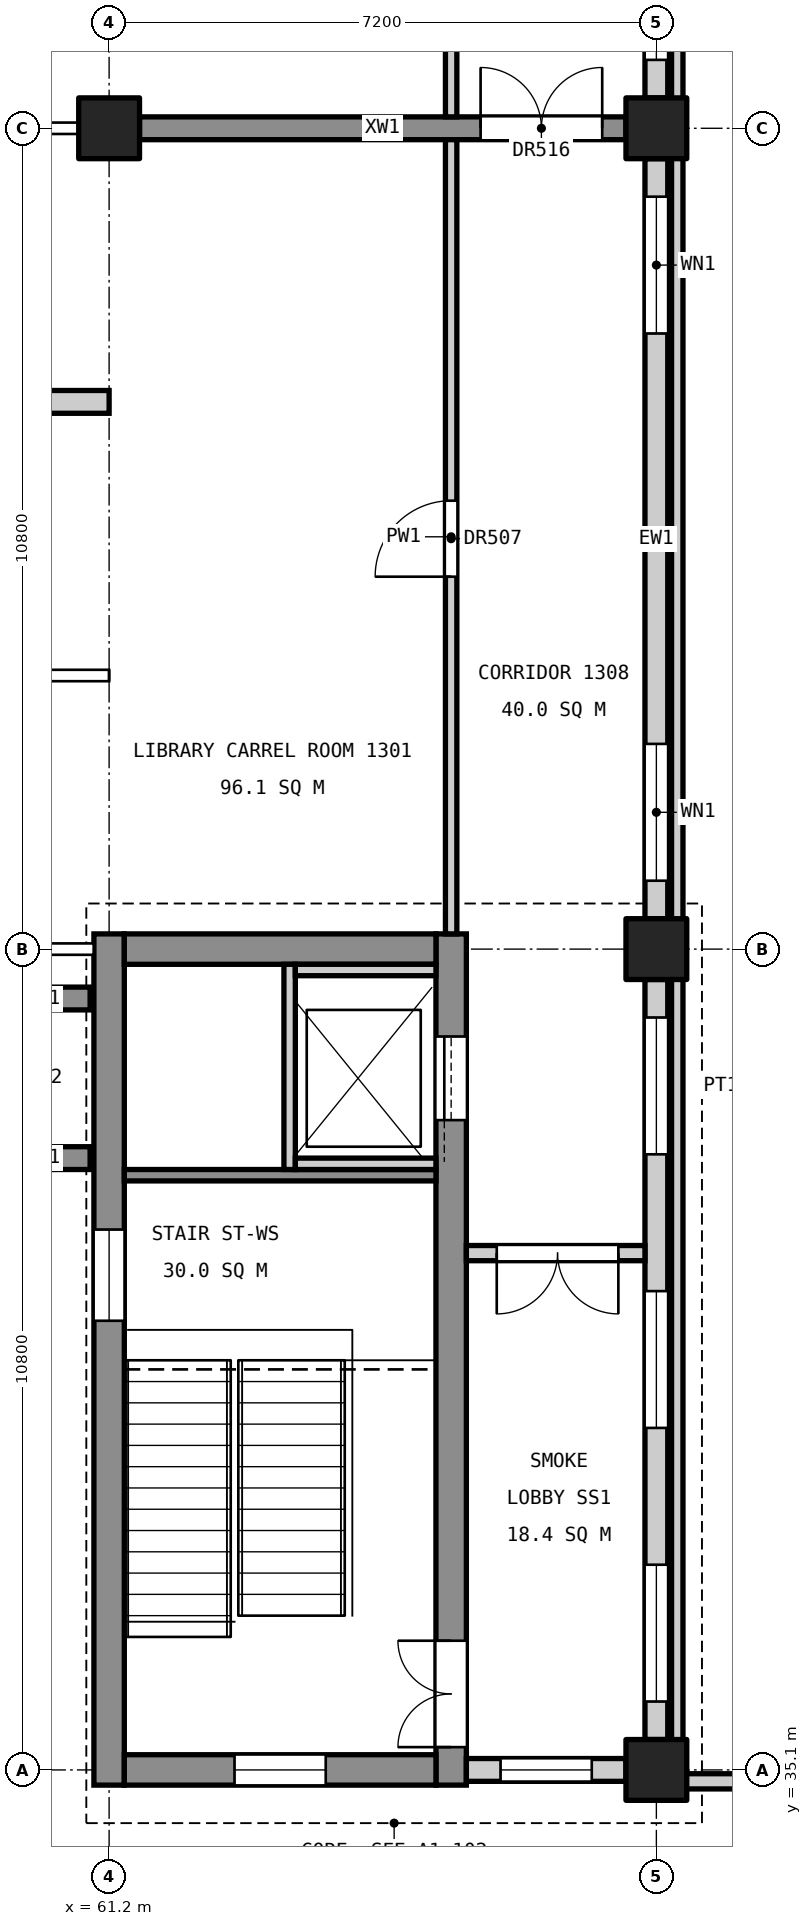
"""IFC4 building model, lengths in metres.
Left out: names, types, materials, properties, quantities, classifications, styles, units other than length and angle.
Written with IfcOpenShell. Run it as: python <this file> out.ifc"""

import sys

from ifc_helpers import new_model, si_unit, direction, frame, frame_2d, origin, origin_2d, place, context, subcontext, project, spatial, rectangle, extrude, element, fill, save


model = new_model("IFC4")
c1 = context("Model", 3, precision=1e-05, world=origin(), true_north=direction((0.0, 1.0)))
c2 = subcontext(c1, "Body", "Model", "MODEL_VIEW")
j1 = project(units=[si_unit("LENGTHUNIT", "METRE"), si_unit("PLANEANGLEUNIT", "RADIAN")], contexts=[c1])
p1 = place(None, origin())
s1 = spatial("IfcSite", under=j1, at=p1, CompositionType="ELEMENT")
p2 = place(p1, origin())
s2 = spatial("IfcBuilding", under=s1, at=p2, CompositionType="ELEMENT")
p3 = place(p2, frame((0.0, 0.0, 65.4)))
s3 = spatial("IfcBuildingStorey", under=s2, at=p3, CompositionType="ELEMENT", Elevation=65.4)
for number, where, z_axis, x_axis in (
    (1, (61.2, 56.7, 0.0), (0.0, 0.0, 1.0), (1.0, 0.0, 0.0)),
    (2, (68.4, 35.1, 0.0), (0.0, 0.0, 1.0), (1.0, 0.0, 0.0)),
    (3, (68.4, 45.9, 0.0), (0.0, 0.0, 1.0), (1.0, 0.0, 0.0)),
    (4, (68.4, 56.7, 0.0), (0.0, 0.0, 1.0), (1.0, 0.0, 0.0)),
):
    element("IfcColumn", number, at=place(p3, frame(where, z_axis=z_axis, x_axis=x_axis)), inside=s3, PredefinedType="COLUMN", context=c2, shape_type="SweptSolid", body=[
        extrude(rectangle(XDim=0.8, YDim=0.8, at=origin_2d()), origin(), (0.0, 0.0, 1.0), 4.8),
    ])
p4 = place(p3, frame((61.2, 34.9, 0.0), z_axis=(0.0, 0.0, 1.0), x_axis=(0.0, 1.0, 0.0)))
e5 = element("IfcWall", 5, at=p4, inside=s3, PredefinedType="SHEAR", context=c2, shape_type="SweptSolid", body=[
    extrude(rectangle(XDim=11.2, YDim=0.4, at=frame_2d((5.6, 0.0))), origin(), (0.0, 0.0, 1.0), 4.55),
])
p5 = place(p4, frame((6.11, 0.0, 3.4)))
e6 = element("IfcOpeningElement", 6, at=p5, cuts=e5, PredefinedType="OPENING", context=c2, shape_type="SweptSolid", body=[
    extrude(rectangle(XDim=1.2, YDim=0.9, at=frame_2d((0.6, 0.45))), frame((0.0, 0.21, 0.0), z_axis=(0.0, -1.0, 0.0), x_axis=(1.0, 0.0, 0.0)), (0.0, 0.0, 1.0), 0.42),
])
p6 = place(p3, frame((65.7, 34.9, 0.0), z_axis=(0.0, 0.0, 1.0), x_axis=(0.0, 1.0, 0.0)))
e7 = element("IfcWall", 7, at=p6, inside=s3, PredefinedType="SHEAR", context=c2, shape_type="SweptSolid", body=[
    extrude(rectangle(XDim=11.2, YDim=0.4, at=frame_2d((5.6, 0.0))), origin(), (0.0, 0.0, 1.0), 4.55),
])
p7 = place(p6, frame((0.5, 0.0, 0.0)))
e8 = element("IfcOpeningElement", 8, at=p7, cuts=e7, PredefinedType="OPENING", context=c2, shape_type="SweptSolid", body=[
    extrude(rectangle(XDim=1.4, YDim=2.1, at=frame_2d((0.7, 1.05))), frame((0.0, 0.21, 0.0), z_axis=(0.0, -1.0, 0.0), x_axis=(1.0, 0.0, 0.0)), (0.0, 0.0, 1.0), 0.42),
])
p8 = place(p6, frame((8.75, 0.0, 0.0)))
e9 = element("IfcOpeningElement", 9, at=p8, cuts=e7, PredefinedType="OPENING", context=c2, shape_type="SweptSolid", body=[
    extrude(rectangle(XDim=1.1, YDim=2.1, at=frame_2d((0.55, 1.05))), frame((0.0, 0.21, 0.0), z_axis=(0.0, -1.0, 0.0), x_axis=(1.0, 0.0, 0.0)), (0.0, 0.0, 1.0), 0.42),
])
p9 = place(p3, frame((61.4, 35.1, 0.0), z_axis=(0.0, 0.0, 1.0), x_axis=(1.0, 0.0, 0.0)))
e10 = element("IfcWall", 10, at=p9, inside=s3, PredefinedType="SHEAR", context=c2, shape_type="SweptSolid", body=[
    extrude(rectangle(XDim=4.1, YDim=0.4, at=frame_2d((2.05, 0.0))), origin(), (0.0, 0.0, 1.0), 4.55),
])
p10 = place(p9, frame((1.45, 0.0, 3.4)))
e11 = element("IfcOpeningElement", 11, at=p10, cuts=e10, PredefinedType="OPENING", context=c2, shape_type="SweptSolid", body=[
    extrude(rectangle(XDim=1.2, YDim=0.9, at=frame_2d((0.6, 0.45))), frame((0.0, 0.21, 0.0), z_axis=(0.0, -1.0, 0.0), x_axis=(1.0, 0.0, 0.0)), (0.0, 0.0, 1.0), 0.42),
])
p11 = place(p3, frame((61.4, 45.9, 0.0), z_axis=(0.0, 0.0, 1.0), x_axis=(1.0, 0.0, 0.0)))
e12 = element("IfcWall", 12, at=p11, inside=s3, PredefinedType="SHEAR", context=c2, shape_type="SweptSolid", body=[
    extrude(rectangle(XDim=4.1, YDim=0.4, at=frame_2d((2.05, 0.0))), origin(), (0.0, 0.0, 1.0), 4.55),
])
for number, where, z_axis, x_axis in (
    (13, (60.95, 43.15, 0.0), (0.0, 0.0, 1.0), (-1.0, 0.0, 0.0)),
    (14, (60.95, 45.25, 0.0), (0.0, 0.0, 1.0), (-1.0, 0.0, 0.0)),
):
    element("IfcWall", number, at=place(p3, frame(where, z_axis=z_axis, x_axis=x_axis)), inside=s3, PredefinedType="SHEAR", context=c2, shape_type="SweptSolid", body=[
        extrude(rectangle(XDim=1.25, YDim=0.3, at=frame_2d((0.625, 0.0))), origin(), (0.0, 0.0, 1.0), 4.8),
    ])
p12 = place(p3, frame((61.6, 56.7, 0.0), z_axis=(0.0, 0.0, 1.0), x_axis=(1.0, 0.0, 0.0)))
e15 = element("IfcWall", 15, at=p12, inside=s3, PredefinedType="SHEAR", context=c2, shape_type="SweptSolid", body=[
    extrude(rectangle(XDim=6.4, YDim=0.3, at=frame_2d((3.2, 0.0))), origin(), (0.0, 0.0, 1.0), 4.55),
])
p13 = place(p12, frame((4.488, 0.0, 0.0)))
e16 = element("IfcOpeningElement", 16, at=p13, cuts=e15, PredefinedType="OPENING", context=c2, shape_type="SweptSolid", body=[
    extrude(rectangle(XDim=1.6, YDim=2.1, at=frame_2d((0.8, 1.05))), frame((0.0, 0.16, 0.0), z_axis=(0.0, -1.0, 0.0), x_axis=(1.0, 0.0, 0.0)), (0.0, 0.0, 1.0), 0.32),
])
p14 = place(p3, frame((61.4, 42.925, 0.0), z_axis=(0.0, 0.0, 1.0), x_axis=(1.0, 0.0, 0.0)))
e17 = element("IfcWall", 17, at=p14, inside=s3, PredefinedType="SOLIDWALL", context=c2, shape_type="SweptSolid", body=[
    extrude(rectangle(XDim=4.1, YDim=0.15, at=frame_2d((2.05, 0.0))), origin(), (0.0, 0.0, 1.0), 4.55),
])
p15 = place(p3, frame((63.575, 43.0, 0.0), z_axis=(0.0, 0.0, 1.0), x_axis=(0.0, 1.0, 0.0)))
e18 = element("IfcWall", 18, at=p15, inside=s3, PredefinedType="SOLIDWALL", context=c2, shape_type="SweptSolid", body=[
    extrude(rectangle(XDim=2.7, YDim=0.15, at=frame_2d((1.35, 0.0))), origin(), (0.0, 0.0, 1.0), 4.8),
])
for number, where, z_axis, x_axis in (
    (19, (63.65, 43.075, 0.0), (0.0, 0.0, 1.0), (1.0, 0.0, 0.0)),
    (20, (63.65, 45.625, 0.0), (0.0, 0.0, 1.0), (1.0, 0.0, 0.0)),
):
    element("IfcWall", number, at=place(p3, frame(where, z_axis=z_axis, x_axis=x_axis)), inside=s3, PredefinedType="SOLIDWALL", context=c2, shape_type="SweptSolid", body=[
        extrude(rectangle(XDim=1.85, YDim=0.15, at=frame_2d((0.925, 0.0))), origin(), (0.0, 0.0, 1.0), 4.8),
    ])
p16 = place(p3, frame((79.55, 34.95, 0.0), z_axis=(0.0, 0.0, 1.0), x_axis=(-1.0, 0.0, 0.0)))
e21 = element("IfcWall", 21, at=p16, inside=s3, PredefinedType="PARAPET", context=c2, shape_type="SweptSolid", body=[
    extrude(rectangle(XDim=10.8, YDim=0.2, at=frame_2d((5.4, 0.0))), origin(), (0.0, 0.0, 1.0), 1.2),
])
p17 = place(p3, frame((68.675, 35.05, 0.0), z_axis=(0.0, 0.0, 1.0), x_axis=(0.0, 1.0, 0.0)))
e22 = element("IfcWall", 22, at=p17, inside=s3, PredefinedType="PARAPET", context=c2, shape_type="SweptSolid", body=[
    extrude(rectangle(XDim=64.9, YDim=0.15, at=frame_2d((32.45, 0.0))), origin(), (0.0, 0.0, 1.0), 0.3),
])
p18 = place(p3, frame((65.9, 35.1, 0.0), z_axis=(0.0, 0.0, 1.0), x_axis=(1.0, 0.0, 0.0)))
e23 = element("IfcWall", 23, at=p18, inside=s3, PredefinedType="STANDARD", context=c2, shape_type="SweptSolid", body=[
    extrude(rectangle(XDim=2.1, YDim=0.3, at=frame_2d((1.05, 0.0))), origin(), (0.0, 0.0, 1.0), 3.85),
])
p19 = place(p18, frame((0.45, 0.0, 0.9)))
e24 = element("IfcOpeningElement", 24, at=p19, cuts=e23, PredefinedType="OPENING", context=c2, shape_type="SweptSolid", body=[
    extrude(rectangle(XDim=1.2, YDim=2.4, at=frame_2d((0.6, 1.2))), frame((0.0, 0.16, 0.0), z_axis=(0.0, -1.0, 0.0), x_axis=(1.0, 0.0, 0.0)), (0.0, 0.0, 1.0), 0.32),
])
p20 = place(p3, frame((68.4, 35.5, 0.0), z_axis=(0.0, 0.0, 1.0), x_axis=(0.0, 1.0, 0.0)))
e25 = element("IfcWall", 25, at=p20, inside=s3, PredefinedType="STANDARD", context=c2, shape_type="SweptSolid", body=[
    extrude(rectangle(XDim=10.0, YDim=0.3, at=frame_2d((5.0, 0.0))), origin(), (0.0, 0.0, 1.0), 3.55),
])
p21 = place(p20, frame((0.5, 0.0, 0.9)))
e26 = element("IfcOpeningElement", 26, at=p21, cuts=e25, PredefinedType="OPENING", context=c2, shape_type="SweptSolid", body=[
    extrude(rectangle(XDim=1.8, YDim=2.4, at=frame_2d((0.9, 1.2))), frame((0.0, 0.16, 0.0), z_axis=(0.0, -1.0, 0.0), x_axis=(1.0, 0.0, 0.0)), (0.0, 0.0, 1.0), 0.32),
])
p22 = place(p20, frame((4.1, 0.0, 0.9)))
e27 = element("IfcOpeningElement", 27, at=p22, cuts=e25, PredefinedType="OPENING", context=c2, shape_type="SweptSolid", body=[
    extrude(rectangle(XDim=1.8, YDim=2.4, at=frame_2d((0.9, 1.2))), frame((0.0, 0.16, 0.0), z_axis=(0.0, -1.0, 0.0), x_axis=(1.0, 0.0, 0.0)), (0.0, 0.0, 1.0), 0.32),
])
p23 = place(p20, frame((7.7, 0.0, 0.9)))
e28 = element("IfcOpeningElement", 28, at=p23, cuts=e25, PredefinedType="OPENING", context=c2, shape_type="SweptSolid", body=[
    extrude(rectangle(XDim=1.8, YDim=2.4, at=frame_2d((0.9, 1.2))), frame((0.0, 0.16, 0.0), z_axis=(0.0, -1.0, 0.0), x_axis=(1.0, 0.0, 0.0)), (0.0, 0.0, 1.0), 0.32),
])
p24 = place(p3, frame((68.4, 46.3, 0.0), z_axis=(0.0, 0.0, 1.0), x_axis=(0.0, 1.0, 0.0)))
e29 = element("IfcWall", 29, at=p24, inside=s3, PredefinedType="STANDARD", context=c2, shape_type="SweptSolid", body=[
    extrude(rectangle(XDim=10.0, YDim=0.3, at=frame_2d((5.0, 0.0))), origin(), (0.0, 0.0, 1.0), 3.55),
])
p25 = place(p24, frame((0.5, 0.0, 0.9)))
e30 = element("IfcOpeningElement", 30, at=p25, cuts=e29, PredefinedType="OPENING", context=c2, shape_type="SweptSolid", body=[
    extrude(rectangle(XDim=1.8, YDim=2.4, at=frame_2d((0.9, 1.2))), frame((0.0, 0.16, 0.0), z_axis=(0.0, -1.0, 0.0), x_axis=(1.0, 0.0, 0.0)), (0.0, 0.0, 1.0), 0.32),
])
p26 = place(p24, frame((7.7, 0.0, 0.9)))
e31 = element("IfcOpeningElement", 31, at=p26, cuts=e29, PredefinedType="OPENING", context=c2, shape_type="SweptSolid", body=[
    extrude(rectangle(XDim=1.8, YDim=2.4, at=frame_2d((0.9, 1.2))), frame((0.0, 0.16, 0.0), z_axis=(0.0, -1.0, 0.0), x_axis=(1.0, 0.0, 0.0)), (0.0, 0.0, 1.0), 0.32),
])
p27 = place(p3, frame((68.4, 57.1, 0.0), z_axis=(0.0, 0.0, 1.0), x_axis=(0.0, 1.0, 0.0)))
e32 = element("IfcWall", 32, at=p27, inside=s3, PredefinedType="STANDARD", context=c2, shape_type="SweptSolid", body=[
    extrude(rectangle(XDim=10.0, YDim=0.3, at=frame_2d((5.0, 0.0))), origin(), (0.0, 0.0, 1.0), 3.55),
])
p28 = place(p27, frame((0.5, 0.0, 0.9)))
e33 = element("IfcOpeningElement", 33, at=p28, cuts=e32, PredefinedType="OPENING", context=c2, shape_type="SweptSolid", body=[
    extrude(rectangle(XDim=1.8, YDim=2.4, at=frame_2d((0.9, 1.2))), frame((0.0, 0.16, 0.0), z_axis=(0.0, -1.0, 0.0), x_axis=(1.0, 0.0, 0.0)), (0.0, 0.0, 1.0), 0.32),
])
p29 = place(p27, frame((4.1, 0.0, 0.9)))
e34 = element("IfcOpeningElement", 34, at=p29, cuts=e32, PredefinedType="OPENING", context=c2, shape_type="SweptSolid", body=[
    extrude(rectangle(XDim=1.8, YDim=2.4, at=frame_2d((0.9, 1.2))), frame((0.0, 0.16, 0.0), z_axis=(0.0, -1.0, 0.0), x_axis=(1.0, 0.0, 0.0)), (0.0, 0.0, 1.0), 0.32),
])
p30 = place(p27, frame((7.7, 0.0, 0.9)))
e35 = element("IfcOpeningElement", 35, at=p30, cuts=e32, PredefinedType="OPENING", context=c2, shape_type="SweptSolid", body=[
    extrude(rectangle(XDim=1.8, YDim=2.4, at=frame_2d((0.9, 1.2))), frame((0.0, 0.16, 0.0), z_axis=(0.0, -1.0, 0.0), x_axis=(1.0, 0.0, 0.0)), (0.0, 0.0, 1.0), 0.32),
])
p31 = place(p3, frame((56.4, 53.1, 0.0), z_axis=(0.0, 0.0, 1.0), x_axis=(1.0, 0.0, 0.0)))
e36 = element("IfcWall", 36, at=p31, inside=s3, PredefinedType="STANDARD", context=c2, shape_type="SweptSolid", body=[
    extrude(rectangle(XDim=4.8, YDim=0.3, at=frame_2d((2.4, 0.0))), origin(), (0.0, 0.0, 1.0), 3.65),
])
p32 = place(p3, frame((65.7, 46.1, 0.0), z_axis=(0.0, 0.0, 1.0), x_axis=(0.0, 1.0, 0.0)))
e37 = element("IfcWall", 37, at=p32, inside=s3, PredefinedType="PARTITIONING", context=c2, shape_type="SweptSolid", body=[
    extrude(rectangle(XDim=10.45, YDim=0.15, at=frame_2d((5.225, 0.0))), origin(), (0.0, 0.0, 1.0), 3.55),
])
p33 = place(p32, frame((4.7, 0.0, 0.0)))
e38 = element("IfcOpeningElement", 38, at=p33, cuts=e37, PredefinedType="OPENING", context=c2, shape_type="SweptSolid", body=[
    extrude(rectangle(XDim=1.0, YDim=2.1, at=frame_2d((0.5, 1.05))), frame((0.0, 0.085, 0.0), z_axis=(0.0, -1.0, 0.0), x_axis=(1.0, 0.0, 0.0)), (0.0, 0.0, 1.0), 0.17),
])
p34 = place(p3, frame((65.7, 56.85, 0.0), z_axis=(0.0, 0.0, 1.0), x_axis=(0.0, 1.0, 0.0)))
e39 = element("IfcWall", 39, at=p34, inside=s3, PredefinedType="PARTITIONING", context=c2, shape_type="SweptSolid", body=[
    extrude(rectangle(XDim=3.25, YDim=0.15, at=frame_2d((1.625, 0.0))), origin(), (0.0, 0.0, 1.0), 3.55),
])
p35 = place(p34, frame((1.15, 0.0, 0.0)))
e40 = element("IfcOpeningElement", 40, at=p35, cuts=e39, PredefinedType="OPENING", context=c2, shape_type="SweptSolid", body=[
    extrude(rectangle(XDim=1.0, YDim=2.1, at=frame_2d((0.5, 1.05))), frame((0.0, 0.085, 0.0), z_axis=(0.0, -1.0, 0.0), x_axis=(1.0, 0.0, 0.0)), (0.0, 0.0, 1.0), 0.17),
])
p36 = place(p3, frame((65.9, 41.9, 0.0), z_axis=(0.0, 0.0, 1.0), x_axis=(1.0, 0.0, 0.0)))
e41 = element("IfcWall", 41, at=p36, inside=s3, PredefinedType="PARTITIONING", context=c2, shape_type="SweptSolid", body=[
    extrude(rectangle(XDim=2.35, YDim=0.2, at=frame_2d((1.175, 0.0))), origin(), (0.0, 0.0, 1.0), 3.55),
])
p37 = place(p36, frame((0.4, 0.0, 0.0)))
e42 = element("IfcOpeningElement", 42, at=p37, cuts=e41, PredefinedType="OPENING", context=c2, shape_type="SweptSolid", body=[
    extrude(rectangle(XDim=1.6, YDim=2.1, at=frame_2d((0.8, 1.05))), frame((0.0, 0.11, 0.0), z_axis=(0.0, -1.0, 0.0), x_axis=(1.0, 0.0, 0.0)), (0.0, 0.0, 1.0), 0.22),
])
p38 = place(p7, origin())
e43 = element("IfcDoor", 43, at=p38, inside=s3, OperationType="DOUBLE_DOOR_SINGLE_SWING", PredefinedType="DOOR", context=c2, shape_type="SweptSolid", body=[
    extrude(rectangle(XDim=1.4, YDim=2.1, at=frame_2d((0.7, 1.05))), frame((0.0, 0.025, 0.0), z_axis=(0.0, -1.0, 0.0), x_axis=(1.0, 0.0, 0.0)), (0.0, 0.0, 1.0), 0.05),
])
fill(e8, e43)
p39 = place(p8, origin())
e44 = element("IfcDoor", 44, at=p39, inside=s3, OperationType="SLIDING_TO_LEFT", PredefinedType="DOOR", context=c2, shape_type="SweptSolid", body=[
    extrude(rectangle(XDim=1.1, YDim=2.1, at=frame_2d((0.55, 1.05))), frame((0.0, 0.025, 0.0), z_axis=(0.0, -1.0, 0.0), x_axis=(1.0, 0.0, 0.0)), (0.0, 0.0, 1.0), 0.05),
])
fill(e9, e44)
p40 = place(p19, origin())
e45 = element("IfcWindow", 45, at=p40, inside=s3, PartitioningType="SINGLE_PANEL", PredefinedType="WINDOW", context=c2, shape_type="SweptSolid", body=[
    extrude(rectangle(XDim=1.2, YDim=2.4, at=frame_2d((0.6, 1.2))), frame((0.0, 0.03, 0.0), z_axis=(0.0, -1.0, 0.0), x_axis=(1.0, 0.0, 0.0)), (0.0, 0.0, 1.0), 0.06),
])
fill(e24, e45)
p41 = place(p21, origin())
e46 = element("IfcWindow", 46, at=p41, inside=s3, PartitioningType="SINGLE_PANEL", PredefinedType="WINDOW", context=c2, shape_type="SweptSolid", body=[
    extrude(rectangle(XDim=1.8, YDim=2.4, at=frame_2d((0.9, 1.2))), frame((0.0, 0.03, 0.0), z_axis=(0.0, -1.0, 0.0), x_axis=(1.0, 0.0, 0.0)), (0.0, 0.0, 1.0), 0.06),
])
fill(e26, e46)
p42 = place(p22, origin())
e47 = element("IfcWindow", 47, at=p42, inside=s3, PartitioningType="SINGLE_PANEL", PredefinedType="WINDOW", context=c2, shape_type="SweptSolid", body=[
    extrude(rectangle(XDim=1.8, YDim=2.4, at=frame_2d((0.9, 1.2))), frame((0.0, 0.03, 0.0), z_axis=(0.0, -1.0, 0.0), x_axis=(1.0, 0.0, 0.0)), (0.0, 0.0, 1.0), 0.06),
])
fill(e27, e47)
p43 = place(p23, origin())
e48 = element("IfcWindow", 48, at=p43, inside=s3, PartitioningType="SINGLE_PANEL", PredefinedType="WINDOW", context=c2, shape_type="SweptSolid", body=[
    extrude(rectangle(XDim=1.8, YDim=2.4, at=frame_2d((0.9, 1.2))), frame((0.0, 0.03, 0.0), z_axis=(0.0, -1.0, 0.0), x_axis=(1.0, 0.0, 0.0)), (0.0, 0.0, 1.0), 0.06),
])
fill(e28, e48)
p44 = place(p25, origin())
e49 = element("IfcWindow", 49, at=p44, inside=s3, PartitioningType="SINGLE_PANEL", PredefinedType="WINDOW", context=c2, shape_type="SweptSolid", body=[
    extrude(rectangle(XDim=1.8, YDim=2.4, at=frame_2d((0.9, 1.2))), frame((0.0, 0.03, 0.0), z_axis=(0.0, -1.0, 0.0), x_axis=(1.0, 0.0, 0.0)), (0.0, 0.0, 1.0), 0.06),
])
fill(e30, e49)
p45 = place(p26, origin())
e50 = element("IfcWindow", 50, at=p45, inside=s3, PartitioningType="SINGLE_PANEL", PredefinedType="WINDOW", context=c2, shape_type="SweptSolid", body=[
    extrude(rectangle(XDim=1.8, YDim=2.4, at=frame_2d((0.9, 1.2))), frame((0.0, 0.03, 0.0), z_axis=(0.0, -1.0, 0.0), x_axis=(1.0, 0.0, 0.0)), (0.0, 0.0, 1.0), 0.06),
])
fill(e31, e50)
p46 = place(p28, origin())
e51 = element("IfcWindow", 51, at=p46, inside=s3, PartitioningType="SINGLE_PANEL", PredefinedType="WINDOW", context=c2, shape_type="SweptSolid", body=[
    extrude(rectangle(XDim=1.8, YDim=2.4, at=frame_2d((0.9, 1.2))), frame((0.0, 0.03, 0.0), z_axis=(0.0, -1.0, 0.0), x_axis=(1.0, 0.0, 0.0)), (0.0, 0.0, 1.0), 0.06),
])
fill(e33, e51)
p47 = place(p5, origin())
e52 = element("IfcWindow", 52, at=p47, inside=s3, PartitioningType="SINGLE_PANEL", PredefinedType="WINDOW", context=c2, shape_type="SweptSolid", body=[
    extrude(rectangle(XDim=1.2, YDim=0.9, at=frame_2d((0.6, 0.45))), frame((0.0, 0.03, 0.0), z_axis=(0.0, -1.0, 0.0), x_axis=(1.0, 0.0, 0.0)), (0.0, 0.0, 1.0), 0.06),
])
fill(e6, e52)
p48 = place(p10, origin())
e53 = element("IfcWindow", 53, at=p48, inside=s3, PartitioningType="SINGLE_PANEL", PredefinedType="WINDOW", context=c2, shape_type="SweptSolid", body=[
    extrude(rectangle(XDim=1.2, YDim=0.9, at=frame_2d((0.6, 0.45))), frame((0.0, 0.03, 0.0), z_axis=(0.0, -1.0, 0.0), x_axis=(1.0, 0.0, 0.0)), (0.0, 0.0, 1.0), 0.06),
])
fill(e11, e53)
p49 = place(p33, origin())
e54 = element("IfcDoor", 54, at=p49, inside=s3, OperationType="SINGLE_SWING_LEFT", PredefinedType="DOOR", context=c2, shape_type="SweptSolid", body=[
    extrude(rectangle(XDim=1.0, YDim=2.1, at=frame_2d((0.5, 1.05))), frame((0.0, 0.025, 0.0), z_axis=(0.0, -1.0, 0.0), x_axis=(1.0, 0.0, 0.0)), (0.0, 0.0, 1.0), 0.05),
])
fill(e38, e54)
p50 = place(p37, frame((1.6, 0.0, 0.0), z_axis=(0.0, 0.0, 1.0), x_axis=(-1.0, 0.0, 0.0)))
e55 = element("IfcDoor", 55, at=p50, inside=s3, OperationType="DOUBLE_DOOR_SINGLE_SWING", PredefinedType="DOOR", context=c2, shape_type="SweptSolid", body=[
    extrude(rectangle(XDim=1.6, YDim=2.1, at=frame_2d((0.8, 1.05))), frame((0.0, 0.025, 0.0), z_axis=(0.0, -1.0, 0.0), x_axis=(1.0, 0.0, 0.0)), (0.0, 0.0, 1.0), 0.05),
])
fill(e42, e55)
p51 = place(p13, origin())
e56 = element("IfcDoor", 56, at=p51, inside=s3, OperationType="DOUBLE_DOOR_SINGLE_SWING", PredefinedType="DOOR", context=c2, shape_type="SweptSolid", body=[
    extrude(rectangle(XDim=1.6, YDim=2.1, at=frame_2d((0.8, 1.05))), frame((0.0, 0.025, 0.0), z_axis=(0.0, -1.0, 0.0), x_axis=(1.0, 0.0, 0.0)), (0.0, 0.0, 1.0), 0.05),
])
fill(e16, e56)
save(model, sys.argv[1])
